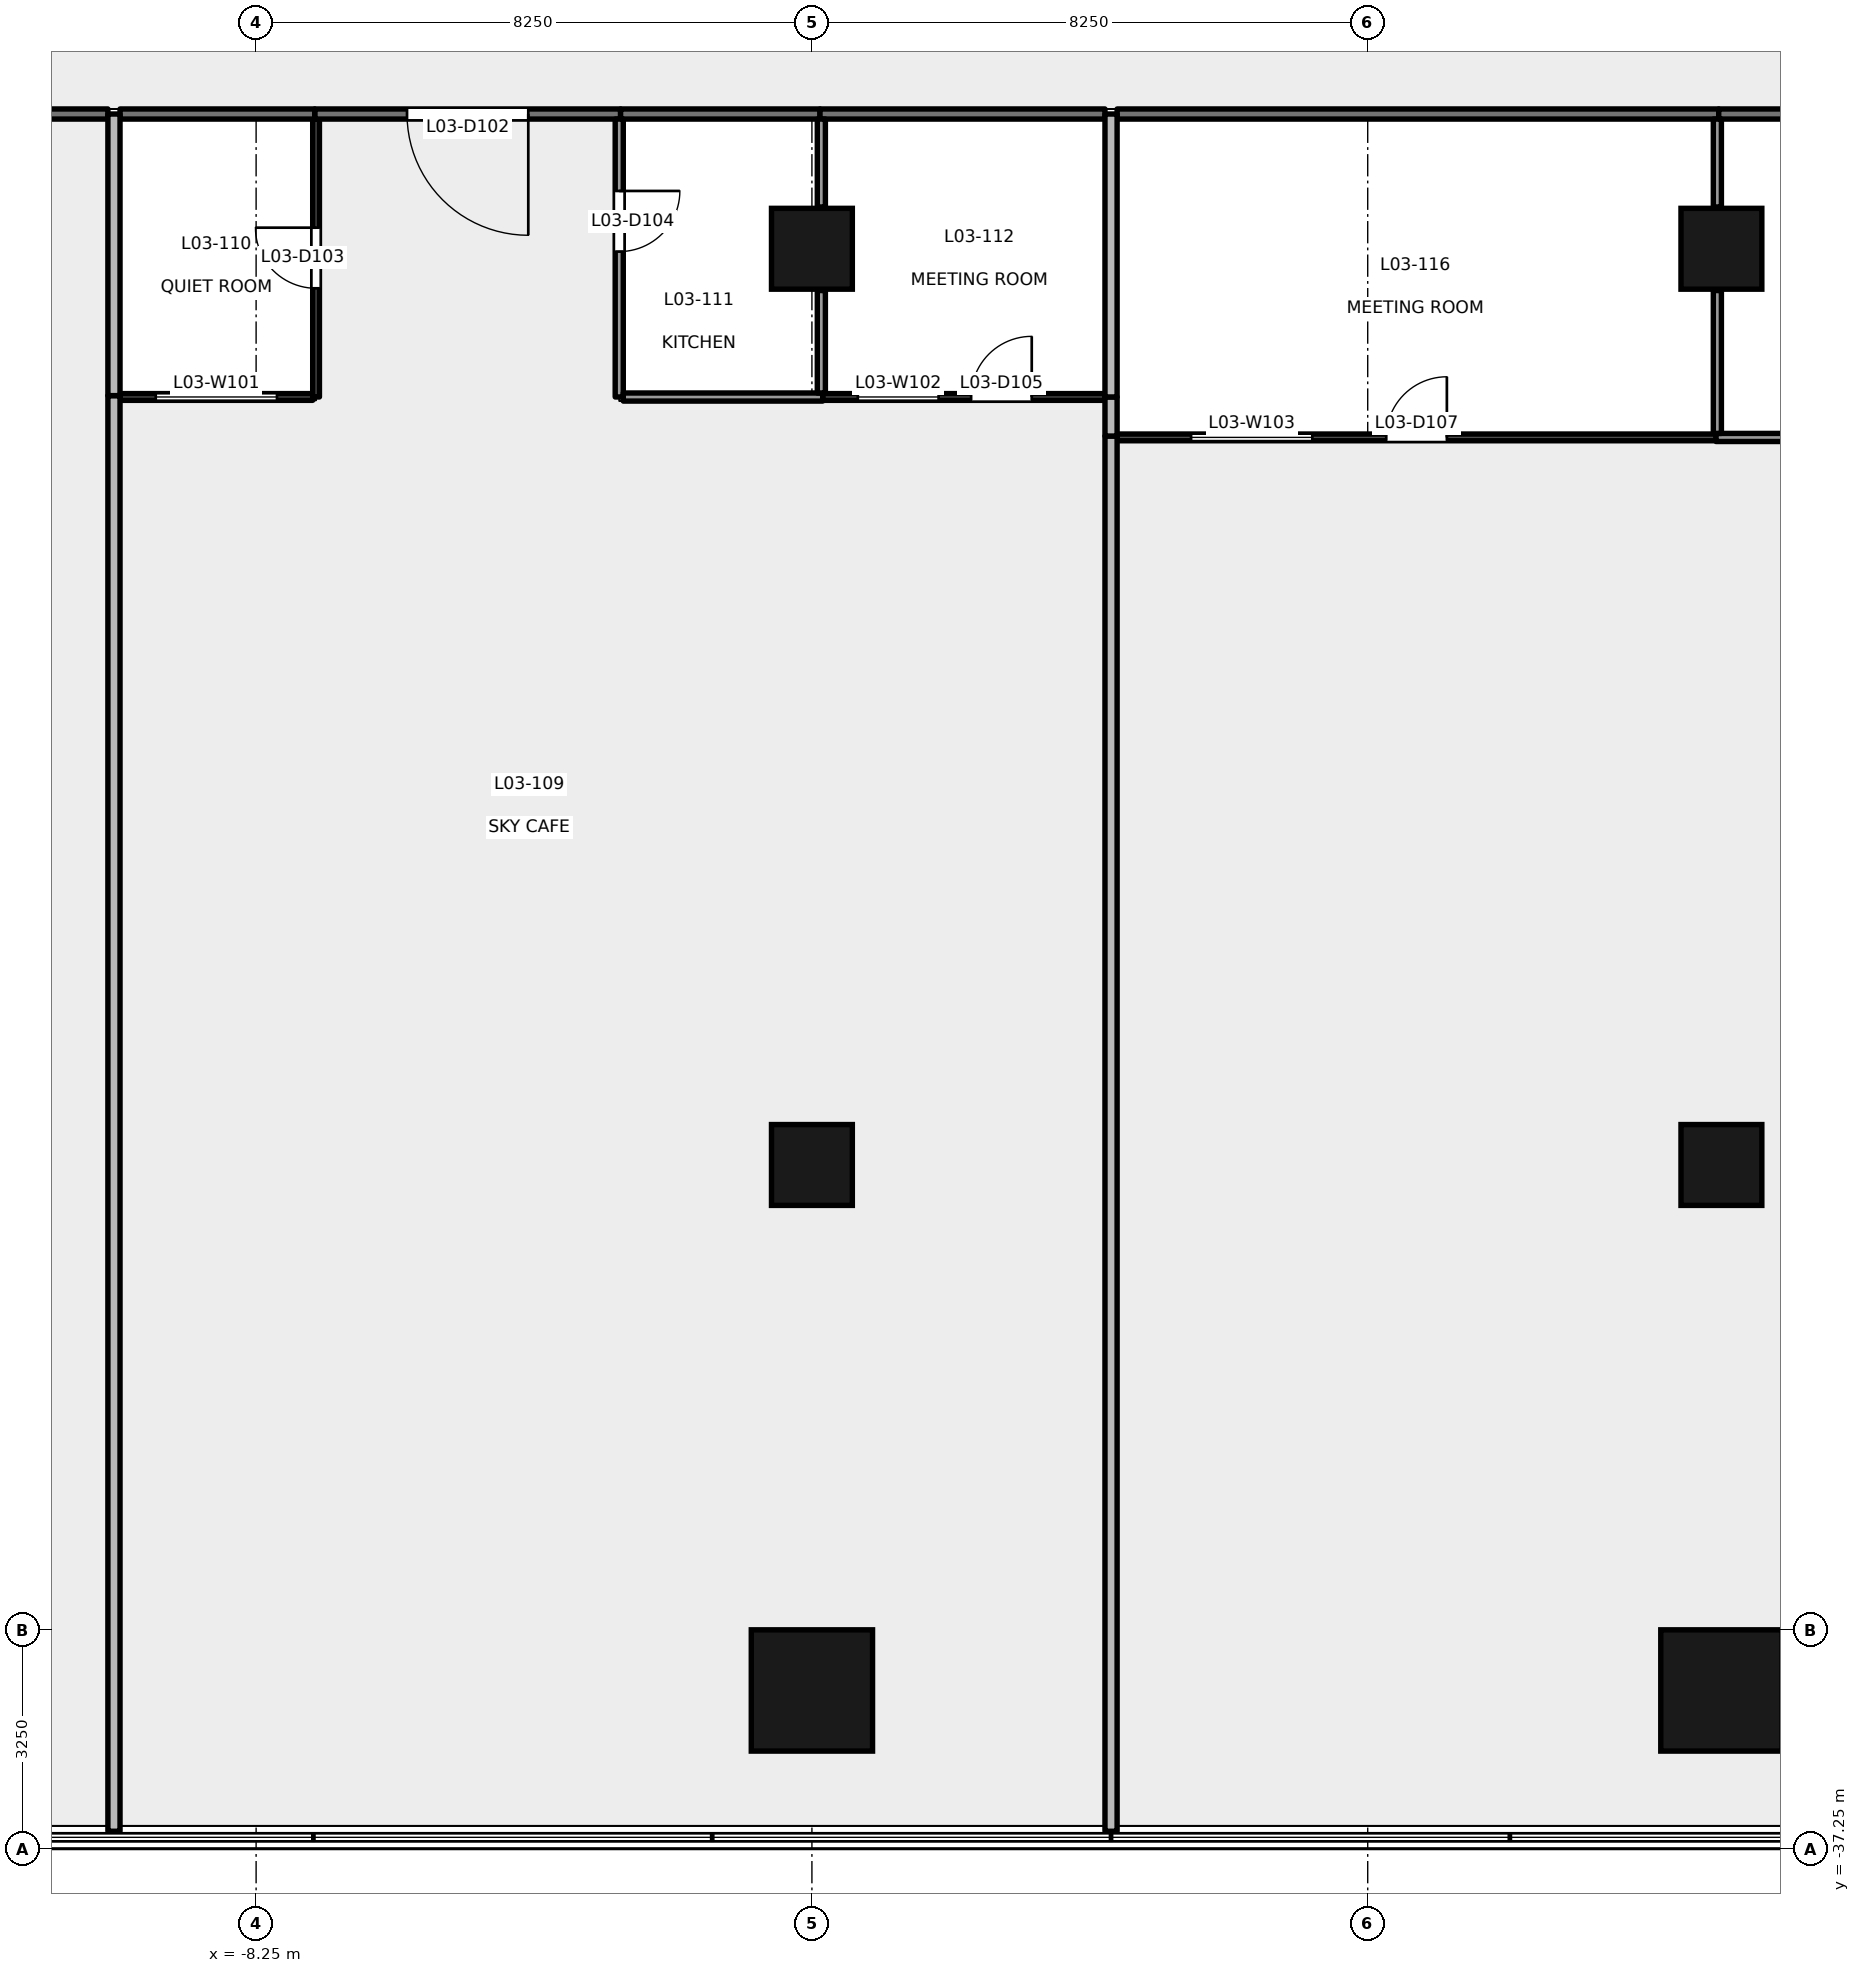
"""IFC4 building model, lengths in metres.
Left out: names, types, materials, properties, quantities, classifications, styles, units other than length and angle.
Written with IfcOpenShell. Run it as: python <this file> out.ifc"""

import sys

from ifc_helpers import new_model, si_unit, direction, frame, frame_2d, origin, origin_2d, place, context, subcontext, project, spatial, rectangle, extrude, element, fill, save


model = new_model("IFC4")
c1 = context("Model", 3, precision=1e-05, world=origin(), true_north=direction((0.0, 1.0)))
c2 = subcontext(c1, "Body", "Model", "MODEL_VIEW")
j1 = project(units=[si_unit("LENGTHUNIT", "METRE"), si_unit("PLANEANGLEUNIT", "RADIAN")], contexts=[c1])
p1 = place(None, origin())
s1 = spatial("IfcSite", under=j1, at=p1, CompositionType="ELEMENT")
p2 = place(p1, origin())
s2 = spatial("IfcBuilding", under=s1, at=p2, CompositionType="ELEMENT")
p3 = place(p2, frame((0.0, 0.0, 17.4)))
s3 = spatial("IfcBuildingStorey", under=s2, at=p3, CompositionType="ELEMENT", Elevation=17.4)
for number, where, z_axis, x_axis in (
    (1, (0.0, -34.9, -0.2), (0.0, 0.0, 1.0), (1.0, 0.0, 0.0)),
    (2, (13.5, -34.9, -0.2), (0.0, 0.0, 1.0), (1.0, 0.0, 0.0)),
):
    element("IfcColumn", number, at=place(p3, frame(where, z_axis=z_axis, x_axis=x_axis)), inside=s3, PredefinedType="COLUMN", context=c2, shape_type="SweptSolid", body=[
        extrude(rectangle(XDim=1.8, YDim=1.8, at=origin_2d()), origin(), (0.0, 0.0, 1.0), 4.8),
    ])
for number, where, z_axis, x_axis in (
    (3, (0.0, -27.1, -0.2), (0.0, 0.0, 1.0), (1.0, 0.0, 0.0)),
    (4, (13.5, -27.1, -0.2), (0.0, 0.0, 1.0), (1.0, 0.0, 0.0)),
    (5, (0.0, -13.5, -0.2), (0.0, 0.0, 1.0), (1.0, 0.0, 0.0)),
    (6, (13.5, -13.5, -0.2), (0.0, 0.0, 1.0), (1.0, 0.0, 0.0)),
):
    element("IfcColumn", number, at=place(p3, frame(where, z_axis=z_axis, x_axis=x_axis)), inside=s3, PredefinedType="COLUMN", context=c2, shape_type="SweptSolid", body=[
        extrude(rectangle(XDim=1.2, YDim=1.2, at=origin_2d()), origin(), (0.0, 0.0, 1.0), 4.8),
    ])
p4 = place(p3, frame((-10.45, -11.5, 0.0), z_axis=(0.0, 0.0, 1.0), x_axis=(-1.0, 0.0, 0.0)))
e7 = element("IfcWall", 7, at=p4, inside=s3, PredefinedType="PARTITIONING", context=c2, shape_type="SweptSolid", body=[
    extrude(rectangle(XDim=8.23, YDim=0.15, at=frame_2d((4.115, 0.0))), origin(), (0.0, 0.0, 1.0), 3.2),
])
p5 = place(p4, frame((1.733, 0.0, 0.0)))
e8 = element("IfcOpeningElement", 8, at=p5, cuts=e7, PredefinedType="OPENING", context=c2, shape_type="SweptSolid", body=[
    extrude(rectangle(XDim=1.8, YDim=2.1, at=frame_2d((0.9, 1.05))), frame((0.0, 0.085, 0.0), z_axis=(0.0, -1.0, 0.0), x_axis=(1.0, 0.0, 0.0)), (0.0, 0.0, 1.0), 0.171),
])
p6 = place(p4, frame((4.646, 0.0, 0.0)))
e9 = element("IfcOpeningElement", 9, at=p6, cuts=e7, PredefinedType="OPENING", context=c2, shape_type="SweptSolid", body=[
    extrude(rectangle(XDim=2.4, YDim=2.4, at=frame_2d((1.2, 1.2))), frame((0.0, 0.085, 0.0), z_axis=(0.0, -1.0, 0.0), x_axis=(1.0, 0.0, 0.0)), (0.0, 0.0, 1.0), 0.171),
])
p7 = place(p3, frame((-2.84, -11.5, 0.0), z_axis=(0.0, 0.0, 1.0), x_axis=(-1.0, 0.0, 0.0)))
e10 = element("IfcWall", 10, at=p7, inside=s3, PredefinedType="PARTITIONING", context=c2, shape_type="SweptSolid", body=[
    extrude(rectangle(XDim=4.54, YDim=0.15, at=frame_2d((2.27, 0.0))), origin(), (0.0, 0.0, 1.0), 4.3),
])
p8 = place(p7, frame((1.37, 0.0, 0.0)))
e11 = element("IfcOpeningElement", 11, at=p8, cuts=e10, PredefinedType="OPENING", context=c2, shape_type="SweptSolid", body=[
    extrude(rectangle(XDim=1.8, YDim=2.1, at=frame_2d((0.9, 1.05))), frame((0.0, 0.085, 0.0), z_axis=(0.0, -1.0, 0.0), x_axis=(1.0, 0.0, 0.0)), (0.0, 0.0, 1.0), 0.171),
])
p9 = place(p3, frame((-7.38, -11.5, 0.0), z_axis=(0.0, 0.0, 1.0), x_axis=(-1.0, 0.0, 0.0)))
e12 = element("IfcWall", 12, at=p9, inside=s3, PredefinedType="PARTITIONING", context=c2, shape_type="SweptSolid", body=[
    extrude(rectangle(XDim=2.89, YDim=0.15, at=frame_2d((1.445, 0.0))), origin(), (0.0, 0.0, 1.0), 4.3),
])
p10 = place(p3, frame((0.12, -11.5, 0.0), z_axis=(0.0, 0.0, 1.0), x_axis=(-1.0, 0.0, 0.0)))
e13 = element("IfcWall", 13, at=p10, inside=s3, PredefinedType="PARTITIONING", context=c2, shape_type="SweptSolid", body=[
    extrude(rectangle(XDim=2.96, YDim=0.15, at=frame_2d((1.48, 0.0))), origin(), (0.0, 0.0, 1.0), 3.2),
])
p11 = place(p3, frame((4.35, -11.5, 0.0), z_axis=(0.0, 0.0, 1.0), x_axis=(-1.0, 0.0, 0.0)))
e14 = element("IfcWall", 14, at=p11, inside=s3, PredefinedType="PARTITIONING", context=c2, shape_type="SweptSolid", body=[
    extrude(rectangle(XDim=4.23, YDim=0.15, at=frame_2d((2.115, 0.0))), origin(), (0.0, 0.0, 1.0), 3.2),
])
p12 = place(p3, frame((13.46, -11.5, 0.0), z_axis=(0.0, 0.0, 1.0), x_axis=(-1.0, 0.0, 0.0)))
e15 = element("IfcWall", 15, at=p12, inside=s3, PredefinedType="PARTITIONING", context=c2, shape_type="SweptSolid", body=[
    extrude(rectangle(XDim=8.93, YDim=0.15, at=frame_2d((4.465, 0.0))), origin(), (0.0, 0.0, 1.0), 3.2),
])
p13 = place(p3, frame((16.42, -11.5, 0.0), z_axis=(0.0, 0.0, 1.0), x_axis=(-1.0, 0.0, 0.0)))
e16 = element("IfcWall", 16, at=p13, inside=s3, PredefinedType="PARTITIONING", context=c2, shape_type="SweptSolid", body=[
    extrude(rectangle(XDim=2.96, YDim=0.15, at=frame_2d((1.48, 0.0))), origin(), (0.0, 0.0, 1.0), 3.2),
])
p14 = place(p3, frame((-10.36, -15.68, 0.0), z_axis=(0.0, 0.0, 1.0), x_axis=(0.0, -1.0, 0.0)))
e17 = element("IfcWall", 17, at=p14, inside=s3, PredefinedType="PARTITIONING", context=c2, shape_type="SweptSolid", body=[
    extrude(rectangle(XDim=21.31, YDim=0.18, at=frame_2d((10.655, 0.0))), origin(), (0.0, 0.0, 1.0), 3.6),
])
p15 = place(p3, frame((-10.36, -11.5, 0.0), z_axis=(0.0, 0.0, 1.0), x_axis=(0.0, -1.0, 0.0)))
e18 = element("IfcWall", 18, at=p15, inside=s3, PredefinedType="PARTITIONING", context=c2, shape_type="SweptSolid", body=[
    extrude(rectangle(XDim=4.18, YDim=0.18, at=frame_2d((2.09, 0.0))), origin(), (0.0, 0.0, 1.0), 3.6),
])
p16 = place(p3, frame((-10.27, -15.7, 0.0), z_axis=(0.0, 0.0, 1.0), x_axis=(1.0, 0.0, 0.0)))
e19 = element("IfcWall", 19, at=p16, inside=s3, PredefinedType="PARTITIONING", context=c2, shape_type="SweptSolid", body=[
    extrude(rectangle(XDim=2.86, YDim=0.1, at=frame_2d((1.43, 0.0))), origin(), (0.0, 0.0, 1.0), 3.99),
])
p17 = place(p16, frame((0.53, 0.0, 0.9)))
e20 = element("IfcOpeningElement", 20, at=p17, cuts=e19, PredefinedType="OPENING", context=c2, shape_type="SweptSolid", body=[
    extrude(rectangle(XDim=1.8, YDim=1.2, at=frame_2d((0.9, 0.6))), frame((0.0, 0.061, 0.0), z_axis=(0.0, -1.0, 0.0), x_axis=(1.0, 0.0, 0.0)), (0.0, 0.0, 1.0), 0.121),
])
p18 = place(p3, frame((-7.36, -15.7, 0.0), z_axis=(0.0, 0.0, 1.0), x_axis=(0.0, 1.0, 0.0)))
e21 = element("IfcWall", 21, at=p18, inside=s3, PredefinedType="PARTITIONING", context=c2, shape_type="SweptSolid", body=[
    extrude(rectangle(XDim=4.125, YDim=0.1, at=frame_2d((2.062, 0.0))), origin(), (0.0, 0.0, 1.0), 3.6),
])
p19 = place(p18, frame((1.613, 0.0, 0.0)))
e22 = element("IfcOpeningElement", 22, at=p19, cuts=e21, PredefinedType="OPENING", context=c2, shape_type="SweptSolid", body=[
    extrude(rectangle(XDim=0.9, YDim=2.1, at=frame_2d((0.45, 1.05))), frame((0.0, 0.061, 0.0), z_axis=(0.0, -1.0, 0.0), x_axis=(1.0, 0.0, 0.0)), (0.0, 0.0, 1.0), 0.121),
])
p20 = place(p3, frame((-2.86, -11.575, 0.0), z_axis=(0.0, 0.0, 1.0), x_axis=(0.0, -1.0, 0.0)))
e23 = element("IfcWall", 23, at=p20, inside=s3, PredefinedType="PARTITIONING", context=c2, shape_type="SweptSolid", body=[
    extrude(rectangle(XDim=4.125, YDim=0.12, at=frame_2d((2.062, 0.0))), origin(), (0.0, 0.0, 1.0), 3.6),
])
p21 = place(p20, frame((1.067, 0.0, 0.0)))
e24 = element("IfcOpeningElement", 24, at=p21, cuts=e23, PredefinedType="OPENING", context=c2, shape_type="SweptSolid", body=[
    extrude(rectangle(XDim=0.9, YDim=2.1, at=frame_2d((0.45, 1.05))), frame((0.0, 0.071, 0.0), z_axis=(0.0, -1.0, 0.0), x_axis=(1.0, 0.0, 0.0)), (0.0, 0.0, 1.0), 0.141),
])
p22 = place(p3, frame((-2.8, -15.701, 0.0), z_axis=(0.0, 0.0, 1.0), x_axis=(1.0, 0.0, 0.0)))
e25 = element("IfcWall", 25, at=p22, inside=s3, PredefinedType="PARTITIONING", context=c2, shape_type="SweptSolid", body=[
    extrude(rectangle(XDim=2.96, YDim=0.12, at=frame_2d((1.48, 0.0))), origin(), (0.0, 0.0, 1.0), 3.6),
])
p23 = place(p3, frame((0.16, -15.7, 0.0), z_axis=(0.0, 0.0, 1.0), x_axis=(1.0, 0.0, 0.0)))
e26 = element("IfcWall", 26, at=p23, inside=s3, PredefinedType="PARTITIONING", context=c2, shape_type="SweptSolid", body=[
    extrude(rectangle(XDim=4.19, YDim=0.1, at=frame_2d((2.095, 0.0))), origin(), (0.0, 0.0, 1.0), 3.6),
])
p24 = place(p23, frame((2.203, 0.0, 0.0)))
e27 = element("IfcOpeningElement", 27, at=p24, cuts=e26, PredefinedType="OPENING", context=c2, shape_type="SweptSolid", body=[
    extrude(rectangle(XDim=0.9, YDim=2.1, at=frame_2d((0.45, 1.05))), frame((0.0, 0.061, 0.0), z_axis=(0.0, -1.0, 0.0), x_axis=(1.0, 0.0, 0.0)), (0.0, 0.0, 1.0), 0.121),
])
p25 = place(p23, frame((0.521, 0.0, 0.9)))
e28 = element("IfcOpeningElement", 28, at=p25, cuts=e26, PredefinedType="OPENING", context=c2, shape_type="SweptSolid", body=[
    extrude(rectangle(XDim=1.2, YDim=1.2, at=frame_2d((0.6, 0.6))), frame((0.0, 0.061, 0.0), z_axis=(0.0, -1.0, 0.0), x_axis=(1.0, 0.0, 0.0)), (0.0, 0.0, 1.0), 0.121),
])
p26 = place(p3, frame((4.44, -16.28, 0.0), z_axis=(0.0, 0.0, 1.0), x_axis=(0.0, -1.0, 0.0)))
e29 = element("IfcWall", 29, at=p26, inside=s3, PredefinedType="PARTITIONING", context=c2, shape_type="SweptSolid", body=[
    extrude(rectangle(XDim=20.71, YDim=0.18, at=frame_2d((10.355, 0.0))), origin(), (0.0, 0.0, 1.0), 3.6),
])
p27 = place(p3, frame((4.44, -15.7, 0.0), z_axis=(0.0, 0.0, 1.0), x_axis=(0.0, -1.0, 0.0)))
e30 = element("IfcWall", 30, at=p27, inside=s3, PredefinedType="PARTITIONING", context=c2, shape_type="SweptSolid", body=[
    extrude(rectangle(XDim=0.58, YDim=0.18, at=frame_2d((0.29, 0.0))), origin(), (0.0, 0.0, 1.0), 3.99),
])
p28 = place(p3, frame((0.14, -14.12, 0.0), z_axis=(0.0, 0.0, 1.0), x_axis=(0.0, -1.0, 0.0)))
e31 = element("IfcWall", 31, at=p28, inside=s3, PredefinedType="PARTITIONING", context=c2, shape_type="SweptSolid", body=[
    extrude(rectangle(XDim=1.521, YDim=0.12, at=frame_2d((0.76, 0.0))), origin(), (0.0, 0.0, 1.0), 3.6),
])
p29 = place(p3, frame((0.14, -11.575, 0.0), z_axis=(0.0, 0.0, 1.0), x_axis=(0.0, -1.0, 0.0)))
e32 = element("IfcWall", 32, at=p29, inside=s3, PredefinedType="PARTITIONING", context=c2, shape_type="SweptSolid", body=[
    extrude(rectangle(XDim=1.305, YDim=0.12, at=frame_2d((0.652, 0.0))), origin(), (0.0, 0.0, 1.0), 3.2),
])
p30 = place(p3, frame((4.44, -11.5, 0.0), z_axis=(0.0, 0.0, 1.0), x_axis=(0.0, -1.0, 0.0)))
e33 = element("IfcWall", 33, at=p30, inside=s3, PredefinedType="PARTITIONING", context=c2, shape_type="SweptSolid", body=[
    extrude(rectangle(XDim=4.2, YDim=0.18, at=frame_2d((2.1, 0.0))), origin(), (0.0, 0.0, 1.0), 3.6),
])
p31 = place(p3, frame((4.53, -16.3, 0.0), z_axis=(0.0, 0.0, 1.0), x_axis=(1.0, 0.0, 0.0)))
e34 = element("IfcWall", 34, at=p31, inside=s3, PredefinedType="PARTITIONING", context=c2, shape_type="SweptSolid", body=[
    extrude(rectangle(XDim=8.89, YDim=0.1, at=frame_2d((4.445, 0.0))), origin(), (0.0, 0.0, 1.0), 3.6),
])
p32 = place(p31, frame((3.995, 0.0, 0.0)))
e35 = element("IfcOpeningElement", 35, at=p32, cuts=e34, PredefinedType="OPENING", context=c2, shape_type="SweptSolid", body=[
    extrude(rectangle(XDim=0.9, YDim=2.1, at=frame_2d((0.45, 1.05))), frame((0.0, 0.061, 0.0), z_axis=(0.0, -1.0, 0.0), x_axis=(1.0, 0.0, 0.0)), (0.0, 0.0, 1.0), 0.121),
])
p33 = place(p31, frame((1.098, 0.0, 0.9)))
e36 = element("IfcOpeningElement", 36, at=p33, cuts=e34, PredefinedType="OPENING", context=c2, shape_type="SweptSolid", body=[
    extrude(rectangle(XDim=1.8, YDim=1.2, at=frame_2d((0.9, 0.6))), frame((0.0, 0.061, 0.0), z_axis=(0.0, -1.0, 0.0), x_axis=(1.0, 0.0, 0.0)), (0.0, 0.0, 1.0), 0.121),
])
p34 = place(p3, frame((13.42, -16.301, 0.0), z_axis=(0.0, 0.0, 1.0), x_axis=(1.0, 0.0, 0.0)))
e37 = element("IfcWall", 37, at=p34, inside=s3, PredefinedType="PARTITIONING", context=c2, shape_type="SweptSolid", body=[
    extrude(rectangle(XDim=2.96, YDim=0.12, at=frame_2d((1.48, 0.0))), origin(), (0.0, 0.0, 1.0), 3.6),
])
p35 = place(p3, frame((13.44, -14.12, 0.0), z_axis=(0.0, 0.0, 1.0), x_axis=(0.0, -1.0, 0.0)))
e38 = element("IfcWall", 38, at=p35, inside=s3, PredefinedType="PARTITIONING", context=c2, shape_type="SweptSolid", body=[
    extrude(rectangle(XDim=2.121, YDim=0.12, at=frame_2d((1.061, 0.0))), origin(), (0.0, 0.0, 1.0), 3.6),
])
p36 = place(p3, frame((13.44, -11.575, 0.0), z_axis=(0.0, 0.0, 1.0), x_axis=(0.0, -1.0, 0.0)))
e39 = element("IfcWall", 39, at=p36, inside=s3, PredefinedType="PARTITIONING", context=c2, shape_type="SweptSolid", body=[
    extrude(rectangle(XDim=1.305, YDim=0.12, at=frame_2d((0.652, 0.0))), origin(), (0.0, 0.0, 1.0), 3.2),
])
p37 = place(p8, origin())
e40 = element("IfcDoor", 40, at=p37, inside=s3, OperationType="DOUBLE_DOOR_SINGLE_SWING", PredefinedType="DOOR", context=c2, shape_type="SweptSolid", body=[
    extrude(rectangle(XDim=1.8, YDim=2.1, at=frame_2d((0.9, 1.05))), frame((0.0, 0.025, 0.0), z_axis=(0.0, -1.0, 0.0), x_axis=(1.0, 0.0, 0.0)), (0.0, 0.0, 1.0), 0.05),
])
fill(e11, e40)
p38 = place(p19, origin())
e41 = element("IfcDoor", 41, at=p38, inside=s3, OperationType="SINGLE_SWING_RIGHT", PredefinedType="DOOR", context=c2, shape_type="SweptSolid", body=[
    extrude(rectangle(XDim=0.9, YDim=2.1, at=frame_2d((0.45, 1.05))), frame((0.0, 0.025, 0.0), z_axis=(0.0, -1.0, 0.0), x_axis=(1.0, 0.0, 0.0)), (0.0, 0.0, 1.0), 0.05),
])
fill(e22, e41)
p39 = place(p21, origin())
e42 = element("IfcDoor", 42, at=p39, inside=s3, OperationType="SINGLE_SWING_LEFT", PredefinedType="DOOR", context=c2, shape_type="SweptSolid", body=[
    extrude(rectangle(XDim=0.9, YDim=2.1, at=frame_2d((0.45, 1.05))), frame((0.0, 0.025, 0.0), z_axis=(0.0, -1.0, 0.0), x_axis=(1.0, 0.0, 0.0)), (0.0, 0.0, 1.0), 0.05),
])
fill(e24, e42)
p40 = place(p24, origin())
e43 = element("IfcDoor", 43, at=p40, inside=s3, OperationType="SINGLE_SWING_RIGHT", PredefinedType="DOOR", context=c2, shape_type="SweptSolid", body=[
    extrude(rectangle(XDim=0.9, YDim=2.1, at=frame_2d((0.45, 1.05))), frame((0.0, 0.025, 0.0), z_axis=(0.0, -1.0, 0.0), x_axis=(1.0, 0.0, 0.0)), (0.0, 0.0, 1.0), 0.05),
])
fill(e27, e43)
p41 = place(p32, origin())
e44 = element("IfcDoor", 44, at=p41, inside=s3, OperationType="SINGLE_SWING_RIGHT", PredefinedType="DOOR", context=c2, shape_type="SweptSolid", body=[
    extrude(rectangle(XDim=0.9, YDim=2.1, at=frame_2d((0.45, 1.05))), frame((0.0, 0.025, 0.0), z_axis=(0.0, -1.0, 0.0), x_axis=(1.0, 0.0, 0.0)), (0.0, 0.0, 1.0), 0.05),
])
fill(e35, e44)
p42 = place(p17, origin())
e45 = element("IfcWindow", 45, at=p42, inside=s3, PartitioningType="SINGLE_PANEL", PredefinedType="WINDOW", context=c2, shape_type="SweptSolid", body=[
    extrude(rectangle(XDim=1.8, YDim=1.2, at=frame_2d((0.9, 0.6))), frame((0.0, 0.03, 0.0), z_axis=(0.0, -1.0, 0.0), x_axis=(1.0, 0.0, 0.0)), (0.0, 0.0, 1.0), 0.06),
])
fill(e20, e45)
p43 = place(p25, origin())
e46 = element("IfcWindow", 46, at=p43, inside=s3, PartitioningType="SINGLE_PANEL", PredefinedType="WINDOW", context=c2, shape_type="SweptSolid", body=[
    extrude(rectangle(XDim=1.2, YDim=1.2, at=frame_2d((0.6, 0.6))), frame((0.0, 0.03, 0.0), z_axis=(0.0, -1.0, 0.0), x_axis=(1.0, 0.0, 0.0)), (0.0, 0.0, 1.0), 0.06),
])
fill(e28, e46)
p44 = place(p33, origin())
e47 = element("IfcWindow", 47, at=p44, inside=s3, PartitioningType="SINGLE_PANEL", PredefinedType="WINDOW", context=c2, shape_type="SweptSolid", body=[
    extrude(rectangle(XDim=1.8, YDim=1.2, at=frame_2d((0.9, 0.6))), frame((0.0, 0.03, 0.0), z_axis=(0.0, -1.0, 0.0), x_axis=(1.0, 0.0, 0.0)), (0.0, 0.0, 1.0), 0.06),
])
fill(e36, e47)
save(model, sys.argv[1])
